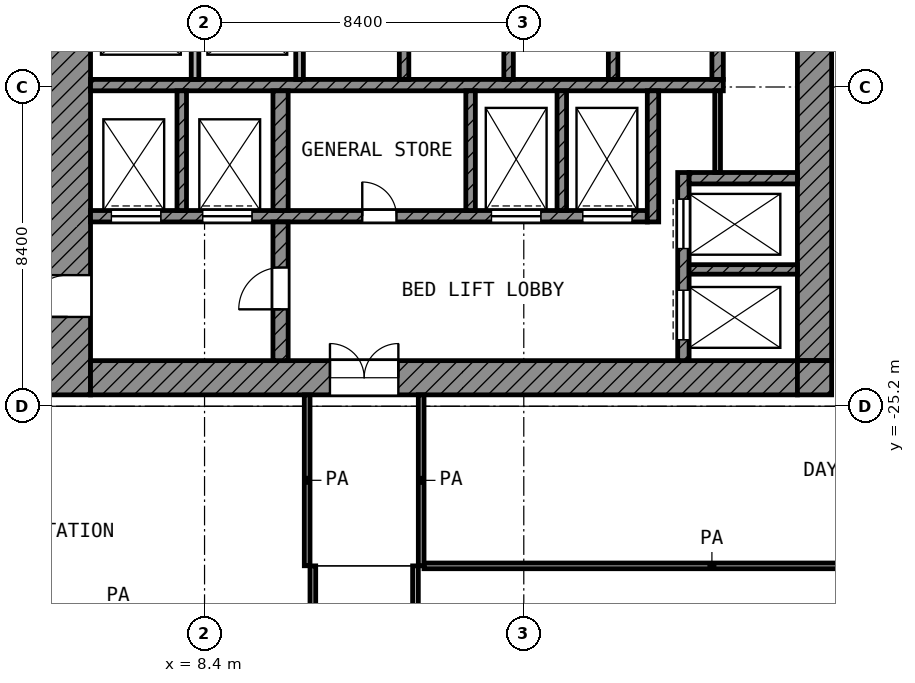
"""IFC4 building model, lengths in metres.
Left out: names, types, materials, properties, quantities, classifications, styles, units other than length and angle.
Written with IfcOpenShell. Run it as: python <this file> out.ifc"""

import sys

from ifc_helpers import new_model, si_unit, direction, frame, frame_2d, origin, place, context, subcontext, project, spatial, rectangle, extrude, element, fill, save


model = new_model("IFC4")
c1 = context("Model", 3, precision=1e-05, world=origin(), true_north=direction((0.0, 1.0)))
c2 = subcontext(c1, "Body", "Model", "MODEL_VIEW")
j1 = project(units=[si_unit("LENGTHUNIT", "METRE"), si_unit("PLANEANGLEUNIT", "RADIAN")], contexts=[c1])
p1 = place(None, origin())
s1 = spatial("IfcSite", under=j1, at=p1, CompositionType="ELEMENT")
p2 = place(p1, origin())
s2 = spatial("IfcBuilding", under=s1, at=p2, CompositionType="ELEMENT")
p3 = place(p2, frame((0.0, 0.0, 208.8)))
s3 = spatial("IfcBuildingStorey", under=s2, at=p3, CompositionType="ELEMENT", Elevation=208.8)
p4 = place(p3, frame((4.8, -24.9, 0.0), z_axis=(0.0, 0.0, 1.0), x_axis=(0.0, 1.0, 0.0)))
e1 = element("IfcWall", 1, at=p4, inside=s3, PredefinedType="SHEAR", context=c2, shape_type="SweptSolid", body=[
    extrude(rectangle(XDim=19.5, YDim=1.2, at=frame_2d((9.75, 0.0))), origin(), (0.0, 0.0, 1.0), 3.7),
])
p5 = place(p4, frame((11.35, 0.0, 0.0)))
e2 = element("IfcOpeningElement", 2, at=p5, cuts=e1, PredefinedType="OPENING", context=c2, shape_type="SweptSolid", body=[
    extrude(rectangle(XDim=1.1, YDim=2.1, at=frame_2d((0.55, 1.05))), frame((0.0, 0.61, 0.0), z_axis=(0.0, -1.0, 0.0), x_axis=(1.0, 0.0, 0.0)), (0.0, 0.0, 1.0), 1.22),
])
p6 = place(p4, frame((2.05, 0.0, 0.0)))
e3 = element("IfcOpeningElement", 3, at=p6, cuts=e1, PredefinedType="OPENING", context=c2, shape_type="SweptSolid", body=[
    extrude(rectangle(XDim=1.1, YDim=2.1, at=frame_2d((0.55, 1.05))), frame((0.0, 0.61, 0.0), z_axis=(0.0, -1.0, 0.0), x_axis=(1.0, 0.0, 0.0)), (0.0, 0.0, 1.0), 1.22),
])
p7 = place(p3, frame((24.45, -24.0, 0.0), z_axis=(0.0, 0.0, 1.0), x_axis=(0.0, 1.0, 0.0)))
e4 = element("IfcWall", 4, at=p7, inside=s3, PredefinedType="SHEAR", context=c2, shape_type="SweptSolid", body=[
    extrude(rectangle(XDim=18.6, YDim=0.9, at=frame_2d((9.3, 0.0))), origin(), (0.0, 0.0, 1.0), 3.7),
])
p8 = place(p7, frame((10.5, 0.0, 0.0)))
e5 = element("IfcOpeningElement", 5, at=p8, cuts=e4, PredefinedType="OPENING", context=c2, shape_type="SweptSolid", body=[
    extrude(rectangle(XDim=1.8, YDim=2.1, at=frame_2d((0.9, 1.05))), frame((0.0, 0.46, 0.0), z_axis=(0.0, -1.0, 0.0), x_axis=(1.0, 0.0, 0.0)), (0.0, 0.0, 1.0), 0.92),
])
p9 = place(p3, frame((5.4, -24.45, 0.0), z_axis=(0.0, 0.0, 1.0), x_axis=(1.0, 0.0, 0.0)))
e6 = element("IfcWall", 6, at=p9, inside=s3, PredefinedType="SHEAR", context=c2, shape_type="SweptSolid", body=[
    extrude(rectangle(XDim=18.6, YDim=0.9, at=frame_2d((9.3, 0.0))), origin(), (0.0, 0.0, 1.0), 3.7),
])
p10 = place(p9, frame((6.3, 0.0, 0.0)))
e7 = element("IfcOpeningElement", 7, at=p10, cuts=e6, PredefinedType="OPENING", context=c2, shape_type="SweptSolid", body=[
    extrude(rectangle(XDim=1.8, YDim=2.1, at=frame_2d((0.9, 1.05))), frame((0.0, 0.46, 0.0), z_axis=(0.0, -1.0, 0.0), x_axis=(1.0, 0.0, 0.0)), (0.0, 0.0, 1.0), 0.92),
])
p11 = place(p3, frame((24.45, -24.9, 0.0), z_axis=(0.0, 0.0, 1.0), x_axis=(0.0, 1.0, 0.0)))
e8 = element("IfcWall", 8, at=p11, inside=s3, PredefinedType="SHEAR", context=c2, shape_type="SweptSolid", body=[
    extrude(rectangle(XDim=0.9, YDim=0.9, at=frame_2d((0.45, 0.0))), origin(), (0.0, 0.0, 1.0), 3.7),
])
p12 = place(p3, frame((5.4, -16.75, 0.0), z_axis=(0.0, 0.0, 1.0), x_axis=(1.0, 0.0, 0.0)))
e9 = element("IfcWall", 9, at=p12, inside=s3, PredefinedType="SHEAR", context=c2, shape_type="SweptSolid", body=[
    extrude(rectangle(XDim=16.65, YDim=0.3, at=frame_2d((8.325, 0.0))), origin(), (0.0, 0.0, 1.0), 3.7),
])
p13 = place(p3, frame((5.4, -20.2, 0.0), z_axis=(0.0, 0.0, 1.0), x_axis=(1.0, 0.0, 0.0)))
e10 = element("IfcWall", 10, at=p13, inside=s3, PredefinedType="SHEAR", context=c2, shape_type="SweptSolid", body=[
    extrude(rectangle(XDim=14.65, YDim=0.3, at=frame_2d((7.325, 0.0))), origin(), (0.0, 0.0, 1.0), 3.7),
])
p14 = place(p13, frame((10.55, 0.0, 0.0)))
e11 = element("IfcOpeningElement", 11, at=p14, cuts=e10, PredefinedType="OPENING", context=c2, shape_type="SweptSolid", body=[
    extrude(rectangle(XDim=1.3, YDim=2.1, at=frame_2d((0.65, 1.05))), frame((0.0, 0.16, 0.0), z_axis=(0.0, -1.0, 0.0), x_axis=(1.0, 0.0, 0.0)), (0.0, 0.0, 1.0), 0.32),
])
p15 = place(p13, frame((12.95, 0.0, 0.0)))
e12 = element("IfcOpeningElement", 12, at=p15, cuts=e10, PredefinedType="OPENING", context=c2, shape_type="SweptSolid", body=[
    extrude(rectangle(XDim=1.3, YDim=2.1, at=frame_2d((0.65, 1.05))), frame((0.0, 0.16, 0.0), z_axis=(0.0, -1.0, 0.0), x_axis=(1.0, 0.0, 0.0)), (0.0, 0.0, 1.0), 0.32),
])
p16 = place(p13, frame((0.55, 0.0, 0.0)))
e13 = element("IfcOpeningElement", 13, at=p16, cuts=e10, PredefinedType="OPENING", context=c2, shape_type="SweptSolid", body=[
    extrude(rectangle(XDim=1.3, YDim=2.1, at=frame_2d((0.65, 1.05))), frame((0.0, 0.16, 0.0), z_axis=(0.0, -1.0, 0.0), x_axis=(1.0, 0.0, 0.0)), (0.0, 0.0, 1.0), 0.32),
])
p17 = place(p13, frame((2.95, 0.0, 0.0)))
e14 = element("IfcOpeningElement", 14, at=p17, cuts=e10, PredefinedType="OPENING", context=c2, shape_type="SweptSolid", body=[
    extrude(rectangle(XDim=1.3, YDim=2.1, at=frame_2d((0.65, 1.05))), frame((0.0, 0.16, 0.0), z_axis=(0.0, -1.0, 0.0), x_axis=(1.0, 0.0, 0.0)), (0.0, 0.0, 1.0), 0.32),
])
p18 = place(p13, frame((7.15, 0.0, 0.0)))
e15 = element("IfcOpeningElement", 15, at=p18, cuts=e10, PredefinedType="OPENING", context=c2, shape_type="SweptSolid", body=[
    extrude(rectangle(XDim=0.9, YDim=2.1, at=frame_2d((0.45, 1.05))), frame((0.0, 0.16, 0.0), z_axis=(0.0, -1.0, 0.0), x_axis=(1.0, 0.0, 0.0)), (0.0, 0.0, 1.0), 0.32),
])
p19 = place(p3, frame((10.4, -24.0, 0.0), z_axis=(0.0, 0.0, 1.0), x_axis=(0.0, 1.0, 0.0)))
e16 = element("IfcWall", 16, at=p19, inside=s3, PredefinedType="SHEAR", context=c2, shape_type="SweptSolid", body=[
    extrude(rectangle(XDim=3.65, YDim=0.4, at=frame_2d((1.825, 0.0))), origin(), (0.0, 0.0, 1.0), 3.7),
])
p20 = place(p19, frame((1.35, 0.0, 0.0)))
e17 = element("IfcOpeningElement", 17, at=p20, cuts=e16, PredefinedType="OPENING", context=c2, shape_type="SweptSolid", body=[
    extrude(rectangle(XDim=1.1, YDim=2.1, at=frame_2d((0.55, 1.05))), frame((0.0, 0.21, 0.0), z_axis=(0.0, -1.0, 0.0), x_axis=(1.0, 0.0, 0.0)), (0.0, 0.0, 1.0), 0.42),
])
p21 = place(p3, frame((10.4, -20.05, 0.0), z_axis=(0.0, 0.0, 1.0), x_axis=(0.0, 1.0, 0.0)))
e18 = element("IfcWall", 18, at=p21, inside=s3, PredefinedType="SHEAR", context=c2, shape_type="SweptSolid", body=[
    extrude(rectangle(XDim=3.15, YDim=0.4, at=frame_2d((1.575, 0.0))), origin(), (0.0, 0.0, 1.0), 3.7),
])
p22 = place(p3, frame((20.2, -20.35, 0.0), z_axis=(0.0, 0.0, 1.0), x_axis=(0.0, 1.0, 0.0)))
e19 = element("IfcWall", 19, at=p22, inside=s3, PredefinedType="SHEAR", context=c2, shape_type="SweptSolid", body=[
    extrude(rectangle(XDim=3.45, YDim=0.3, at=frame_2d((1.725, 0.0))), origin(), (0.0, 0.0, 1.0), 3.7),
])
p23 = place(p3, frame((21.9, -16.6, 0.0), z_axis=(0.0, 0.0, 1.0), x_axis=(0.0, 1.0, 0.0)))
e20 = element("IfcWall", 20, at=p23, inside=s3, PredefinedType="SHEAR", context=c2, shape_type="SweptSolid", body=[
    extrude(rectangle(XDim=2.35, YDim=0.3, at=frame_2d((1.175, 0.0))), origin(), (0.0, 0.0, 1.0), 3.7),
])
p24 = place(p3, frame((21.15, -19.2, 0.0), z_axis=(0.0, 0.0, 1.0), x_axis=(1.0, 0.0, 0.0)))
e21 = element("IfcWall", 21, at=p24, inside=s3, PredefinedType="SHEAR", context=c2, shape_type="SweptSolid", body=[
    extrude(rectangle(XDim=2.85, YDim=0.3, at=frame_2d((1.425, 0.0))), origin(), (0.0, 0.0, 1.0), 3.7),
])
p25 = place(p3, frame((21.0, -24.0, 0.0), z_axis=(0.0, 0.0, 1.0), x_axis=(0.0, 1.0, 0.0)))
e22 = element("IfcWall", 22, at=p25, inside=s3, PredefinedType="SHEAR", context=c2, shape_type="SweptSolid", body=[
    extrude(rectangle(XDim=4.95, YDim=0.3, at=frame_2d((2.475, 0.0))), origin(), (0.0, 0.0, 1.0), 3.7),
])
p26 = place(p25, frame((2.95, 0.0, 0.0)))
e23 = element("IfcOpeningElement", 23, at=p26, cuts=e22, PredefinedType="OPENING", context=c2, shape_type="SweptSolid", body=[
    extrude(rectangle(XDim=1.3, YDim=2.1, at=frame_2d((0.65, 1.05))), frame((0.0, 0.16, 0.0), z_axis=(0.0, -1.0, 0.0), x_axis=(1.0, 0.0, 0.0)), (0.0, 0.0, 1.0), 0.32),
])
p27 = place(p25, frame((0.55, 0.0, 0.0)))
e24 = element("IfcOpeningElement", 24, at=p27, cuts=e22, PredefinedType="OPENING", context=c2, shape_type="SweptSolid", body=[
    extrude(rectangle(XDim=1.3, YDim=2.1, at=frame_2d((0.65, 1.05))), frame((0.0, 0.16, 0.0), z_axis=(0.0, -1.0, 0.0), x_axis=(1.0, 0.0, 0.0)), (0.0, 0.0, 1.0), 0.32),
])
p28 = place(p3, frame((21.15, -21.6, 0.0), z_axis=(0.0, 0.0, 1.0), x_axis=(1.0, 0.0, 0.0)))
e25 = element("IfcWall", 25, at=p28, inside=s3, PredefinedType="SHEAR", context=c2, shape_type="SweptSolid", body=[
    extrude(rectangle(XDim=2.85, YDim=0.25, at=frame_2d((1.425, 0.0))), origin(), (0.0, 0.0, 1.0), 3.7),
])
for number, where, z_axis, x_axis in (
    (26, (7.8, -20.05, 0.0), (0.0, 0.0, 1.0), (0.0, 1.0, 0.0)),
    (27, (15.4, -20.05, 0.0), (0.0, 0.0, 1.0), (0.0, 1.0, 0.0)),
    (28, (17.8, -20.05, 0.0), (0.0, 0.0, 1.0), (0.0, 1.0, 0.0)),
):
    element("IfcWall", number, at=place(p3, frame(where, z_axis=z_axis, x_axis=x_axis)), inside=s3, PredefinedType="SHEAR", context=c2, shape_type="SweptSolid", body=[
        extrude(rectangle(XDim=3.15, YDim=0.25, at=frame_2d((1.575, 0.0))), origin(), (0.0, 0.0, 1.0), 3.7),
    ])
for number, where, z_axis, x_axis in (
    (29, (8.15, -16.6, 0.0), (0.0, 0.0, 1.0), (0.0, 1.0, 0.0)),
    (30, (10.9, -16.6, 0.0), (0.0, 0.0, 1.0), (0.0, 1.0, 0.0)),
):
    element("IfcWall", number, at=place(p3, frame(where, z_axis=z_axis, x_axis=x_axis)), inside=s3, PredefinedType="PARTITIONING", context=c2, shape_type="SweptSolid", body=[
        extrude(rectangle(XDim=2.35, YDim=0.2, at=frame_2d((1.175, 0.0))), origin(), (0.0, 0.0, 1.0), 3.7),
    ])
for number, where, z_axis, x_axis in (
    (31, (13.65, -16.6, 0.0), (0.0, 0.0, 1.0), (0.0, 1.0, 0.0)),
    (32, (16.4, -16.6, 0.0), (0.0, 0.0, 1.0), (0.0, 1.0, 0.0)),
    (33, (19.15, -16.6, 0.0), (0.0, 0.0, 1.0), (0.0, 1.0, 0.0)),
):
    element("IfcWall", number, at=place(p3, frame(where, z_axis=z_axis, x_axis=x_axis)), inside=s3, PredefinedType="SHEAR", context=c2, shape_type="SweptSolid", body=[
        extrude(rectangle(XDim=2.35, YDim=0.25, at=frame_2d((1.175, 0.0))), origin(), (0.0, 0.0, 1.0), 3.7),
    ])
p29 = place(p3, frame((21.9, -19.05, 0.0), z_axis=(0.0, 0.0, 1.0), x_axis=(0.0, 1.0, 0.0)))
e34 = element("IfcWall", 34, at=p29, inside=s3, PredefinedType="PARTITIONING", context=c2, shape_type="SweptSolid", body=[
    extrude(rectangle(XDim=2.15, YDim=0.15, at=frame_2d((1.075, 0.0))), origin(), (0.0, 0.0, 1.0), 3.7),
])
p30 = place(p3, frame((14.175, -29.4, 0.0), z_axis=(0.0, 0.0, 1.0), x_axis=(1.0, 0.0, 0.0)))
e35 = element("IfcWall", 35, at=p30, inside=s3, PredefinedType="PARTITIONING", context=c2, shape_type="SweptSolid", body=[
    extrude(rectangle(XDim=15.15, YDim=0.15, at=frame_2d((7.575, 0.0))), origin(), (0.0, 0.0, 1.0), 3.7),
])
p31 = place(p3, frame((11.1, -29.397, 0.0), z_axis=(0.0, 0.0, 1.0), x_axis=(0.0, 1.0, 0.0)))
e36 = element("IfcWall", 36, at=p31, inside=s3, PredefinedType="PARTITIONING", context=c2, shape_type="SweptSolid", body=[
    extrude(rectangle(XDim=4.497, YDim=0.15, at=frame_2d((2.249, 0.0))), origin(), (0.0, 0.0, 1.0), 3.7),
])
p32 = place(p3, frame((11.25, -31.857, 0.0), z_axis=(0.0, 0.0, 1.0), x_axis=(0.0, 1.0, 0.0)))
e37 = element("IfcWall", 37, at=p32, inside=s3, PredefinedType="PARTITIONING", context=c2, shape_type="SweptSolid", body=[
    extrude(rectangle(XDim=2.457, YDim=0.15, at=frame_2d((1.229, 0.0))), origin(), (0.0, 0.0, 1.0), 3.7),
])
p33 = place(p3, frame((13.95, -54.52, 0.0), z_axis=(0.0, 0.0, 1.0), x_axis=(0.0, 1.0, 0.0)))
e38 = element("IfcWall", 38, at=p33, inside=s3, PredefinedType="PARTITIONING", context=c2, shape_type="SweptSolid", body=[
    extrude(rectangle(XDim=25.12, YDim=0.15, at=frame_2d((12.56, 0.0))), origin(), (0.0, 0.0, 1.0), 3.7),
])
p34 = place(p33, frame((20.02, 0.0, 0.0)))
e39 = element("IfcOpeningElement", 39, at=p34, cuts=e38, PredefinedType="OPENING", context=c2, shape_type="SweptSolid", body=[
    extrude(rectangle(XDim=1.2, YDim=2.1, at=frame_2d((0.6, 1.05))), frame((0.0, 0.085, 0.0), z_axis=(0.0, -1.0, 0.0), x_axis=(1.0, 0.0, 0.0)), (0.0, 0.0, 1.0), 0.17),
])
p35 = place(p33, frame((12.595, 0.0, 0.0)))
e40 = element("IfcOpeningElement", 40, at=p35, cuts=e38, PredefinedType="OPENING", context=c2, shape_type="SweptSolid", body=[
    extrude(rectangle(XDim=1.2, YDim=2.1, at=frame_2d((0.6, 1.05))), frame((0.0, 0.085, 0.0), z_axis=(0.0, -1.0, 0.0), x_axis=(1.0, 0.0, 0.0)), (0.0, 0.0, 1.0), 0.17),
])
p36 = place(p33, frame((11.07, 0.0, 0.0)))
e41 = element("IfcOpeningElement", 41, at=p36, cuts=e38, PredefinedType="OPENING", context=c2, shape_type="SweptSolid", body=[
    extrude(rectangle(XDim=1.2, YDim=2.1, at=frame_2d((0.6, 1.05))), frame((0.0, 0.085, 0.0), z_axis=(0.0, -1.0, 0.0), x_axis=(1.0, 0.0, 0.0)), (0.0, 0.0, 1.0), 0.17),
])
p37 = place(p33, frame((9.07, 0.0, 0.0)))
e42 = element("IfcOpeningElement", 42, at=p37, cuts=e38, PredefinedType="OPENING", context=c2, shape_type="SweptSolid", body=[
    extrude(rectangle(XDim=1.2, YDim=2.1, at=frame_2d((0.6, 1.05))), frame((0.0, 0.085, 0.0), z_axis=(0.0, -1.0, 0.0), x_axis=(1.0, 0.0, 0.0)), (0.0, 0.0, 1.0), 0.17),
])
p38 = place(p33, frame((5.12, 0.0, 0.0)))
e43 = element("IfcOpeningElement", 43, at=p38, cuts=e38, PredefinedType="OPENING", context=c2, shape_type="SweptSolid", body=[
    extrude(rectangle(XDim=1.2, YDim=2.1, at=frame_2d((0.6, 1.05))), frame((0.0, 0.085, 0.0), z_axis=(0.0, -1.0, 0.0), x_axis=(1.0, 0.0, 0.0)), (0.0, 0.0, 1.0), 0.17),
])
p39 = place(p33, frame((1.52, 0.0, 0.0)))
e44 = element("IfcOpeningElement", 44, at=p39, cuts=e38, PredefinedType="OPENING", context=c2, shape_type="SweptSolid", body=[
    extrude(rectangle(XDim=1.0, YDim=2.1, at=frame_2d((0.5, 1.05))), frame((0.0, 0.085, 0.0), z_axis=(0.0, -1.0, 0.0), x_axis=(1.0, 0.0, 0.0)), (0.0, 0.0, 1.0), 0.17),
])
p40 = place(p3, frame((14.1, -29.4, 0.0), z_axis=(0.0, 0.0, 1.0), x_axis=(0.0, 1.0, 0.0)))
e45 = element("IfcWall", 45, at=p40, inside=s3, PredefinedType="PARTITIONING", context=c2, shape_type="SweptSolid", body=[
    extrude(rectangle(XDim=4.5, YDim=0.15, at=frame_2d((2.25, 0.0))), origin(), (0.0, 0.0, 1.0), 3.7),
])
p41 = place(p26, origin())
e46 = element("IfcDoor", 46, at=p41, inside=s3, OperationType="DOUBLE_DOOR_SLIDING", PredefinedType="DOOR", context=c2, shape_type="SweptSolid", body=[
    extrude(rectangle(XDim=1.3, YDim=2.1, at=frame_2d((0.65, 1.05))), frame((0.0, 0.025, 0.0), z_axis=(0.0, -1.0, 0.0), x_axis=(1.0, 0.0, 0.0)), (0.0, 0.0, 1.0), 0.05),
])
fill(e23, e46)
p42 = place(p27, origin())
e47 = element("IfcDoor", 47, at=p42, inside=s3, OperationType="DOUBLE_DOOR_SLIDING", PredefinedType="DOOR", context=c2, shape_type="SweptSolid", body=[
    extrude(rectangle(XDim=1.3, YDim=2.1, at=frame_2d((0.65, 1.05))), frame((0.0, 0.025, 0.0), z_axis=(0.0, -1.0, 0.0), x_axis=(1.0, 0.0, 0.0)), (0.0, 0.0, 1.0), 0.05),
])
fill(e24, e47)
p43 = place(p14, origin())
e48 = element("IfcDoor", 48, at=p43, inside=s3, OperationType="DOUBLE_DOOR_SLIDING", PredefinedType="DOOR", context=c2, shape_type="SweptSolid", body=[
    extrude(rectangle(XDim=1.3, YDim=2.1, at=frame_2d((0.65, 1.05))), frame((0.0, 0.025, 0.0), z_axis=(0.0, -1.0, 0.0), x_axis=(1.0, 0.0, 0.0)), (0.0, 0.0, 1.0), 0.05),
])
fill(e11, e48)
p44 = place(p15, origin())
e49 = element("IfcDoor", 49, at=p44, inside=s3, OperationType="DOUBLE_DOOR_SLIDING", PredefinedType="DOOR", context=c2, shape_type="SweptSolid", body=[
    extrude(rectangle(XDim=1.3, YDim=2.1, at=frame_2d((0.65, 1.05))), frame((0.0, 0.025, 0.0), z_axis=(0.0, -1.0, 0.0), x_axis=(1.0, 0.0, 0.0)), (0.0, 0.0, 1.0), 0.05),
])
fill(e12, e49)
p45 = place(p16, origin())
e50 = element("IfcDoor", 50, at=p45, inside=s3, OperationType="DOUBLE_DOOR_SLIDING", PredefinedType="DOOR", context=c2, shape_type="SweptSolid", body=[
    extrude(rectangle(XDim=1.3, YDim=2.1, at=frame_2d((0.65, 1.05))), frame((0.0, 0.025, 0.0), z_axis=(0.0, -1.0, 0.0), x_axis=(1.0, 0.0, 0.0)), (0.0, 0.0, 1.0), 0.05),
])
fill(e13, e50)
p46 = place(p17, origin())
e51 = element("IfcDoor", 51, at=p46, inside=s3, OperationType="DOUBLE_DOOR_SLIDING", PredefinedType="DOOR", context=c2, shape_type="SweptSolid", body=[
    extrude(rectangle(XDim=1.3, YDim=2.1, at=frame_2d((0.65, 1.05))), frame((0.0, 0.025, 0.0), z_axis=(0.0, -1.0, 0.0), x_axis=(1.0, 0.0, 0.0)), (0.0, 0.0, 1.0), 0.05),
])
fill(e14, e51)
p47 = place(p6, origin())
e52 = element("IfcDoor", 52, at=p47, inside=s3, OperationType="SINGLE_SWING_LEFT", PredefinedType="DOOR", context=c2, shape_type="SweptSolid", body=[
    extrude(rectangle(XDim=1.1, YDim=2.1, at=frame_2d((0.55, 1.05))), frame((0.0, 0.025, 0.0), z_axis=(0.0, -1.0, 0.0), x_axis=(1.0, 0.0, 0.0)), (0.0, 0.0, 1.0), 0.05),
])
fill(e3, e52)
p48 = place(p20, origin())
e53 = element("IfcDoor", 53, at=p48, inside=s3, OperationType="SINGLE_SWING_LEFT", PredefinedType="DOOR", context=c2, shape_type="SweptSolid", body=[
    extrude(rectangle(XDim=1.1, YDim=2.1, at=frame_2d((0.55, 1.05))), frame((0.0, 0.025, 0.0), z_axis=(0.0, -1.0, 0.0), x_axis=(1.0, 0.0, 0.0)), (0.0, 0.0, 1.0), 0.05),
])
fill(e17, e53)
p49 = place(p10, origin())
e54 = element("IfcDoor", 54, at=p49, inside=s3, OperationType="DOUBLE_DOOR_SINGLE_SWING", PredefinedType="DOOR", context=c2, shape_type="SweptSolid", body=[
    extrude(rectangle(XDim=1.8, YDim=2.1, at=frame_2d((0.9, 1.05))), frame((0.0, 0.025, 0.0), z_axis=(0.0, -1.0, 0.0), x_axis=(1.0, 0.0, 0.0)), (0.0, 0.0, 1.0), 0.05),
])
fill(e7, e54)
p50 = place(p18, origin())
e55 = element("IfcDoor", 55, at=p50, inside=s3, OperationType="SINGLE_SWING_LEFT", PredefinedType="DOOR", context=c2, shape_type="SweptSolid", body=[
    extrude(rectangle(XDim=0.9, YDim=2.1, at=frame_2d((0.45, 1.05))), frame((0.0, 0.025, 0.0), z_axis=(0.0, -1.0, 0.0), x_axis=(1.0, 0.0, 0.0)), (0.0, 0.0, 1.0), 0.05),
])
fill(e15, e55)
save(model, sys.argv[1])
